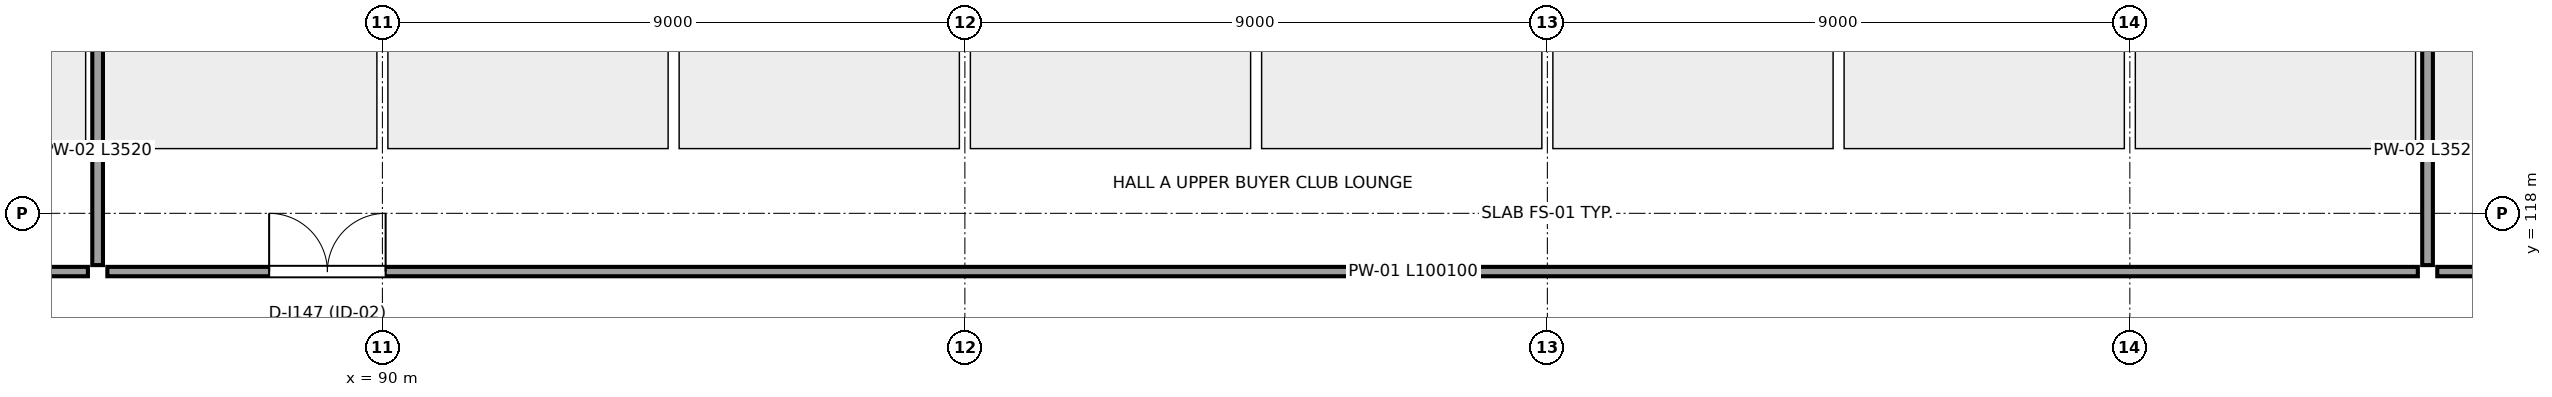
"""IFC4 building model, lengths in metres.
Left out: names, types, materials, properties, quantities, classifications, styles, units other than length and angle.
Written with IfcOpenShell. Run it as: python <this file> out.ifc"""

import sys

from ifc_helpers import new_model, si_unit, direction, frame, frame_2d, origin, place, context, subcontext, project, spatial, rectangle, extrude, element, fill, save


model = new_model("IFC4")
c1 = context("Model", 3, precision=1e-05, world=origin(), true_north=direction((0.0, 1.0)))
c2 = subcontext(c1, "Body", "Model", "MODEL_VIEW")
j1 = project(units=[si_unit("LENGTHUNIT", "METRE"), si_unit("PLANEANGLEUNIT", "RADIAN")], contexts=[c1])
p1 = place(None, origin())
s1 = spatial("IfcSite", under=j1, at=p1, CompositionType="ELEMENT")
p2 = place(p1, origin())
s2 = spatial("IfcBuilding", under=s1, at=p2, CompositionType="ELEMENT")
p3 = place(p2, frame((0.0, 0.0, 12.0)))
s3 = spatial("IfcBuildingStorey", under=s2, at=p3, CompositionType="ELEMENT", Elevation=12.0)
p4 = place(p3, frame((68.15, 117.1, 0.0), z_axis=(0.0, 0.0, 1.0), x_axis=(1.0, 0.0, 0.0)))
e1 = element("IfcWall", 1, at=p4, inside=s3, PredefinedType="PARTITIONING", context=c2, shape_type="SweptSolid", body=[
    extrude(rectangle(XDim=17.3, YDim=0.145, at=frame_2d((8.65, 0.0))), origin(), (0.0, 0.0, 1.0), 2.95),
])
p5 = place(p4, frame((2.5, 0.0, 0.0)))
e2 = element("IfcOpeningElement", 2, at=p5, cuts=e1, PredefinedType="OPENING", context=c2, shape_type="SweptSolid", body=[
    extrude(rectangle(XDim=1.8, YDim=2.3, at=frame_2d((0.9, 1.15))), frame((0.0, 0.083, 0.0), z_axis=(0.0, -1.0, 0.0), x_axis=(1.0, 0.0, 0.0)), (0.0, 0.0, 1.0), 0.165),
])
p6 = place(p3, frame((85.75, 117.1, 0.0), z_axis=(0.0, 0.0, 1.0), x_axis=(1.0, 0.0, 0.0)))
e3 = element("IfcWall", 3, at=p6, inside=s3, PredefinedType="PARTITIONING", context=c2, shape_type="SweptSolid", body=[
    extrude(rectangle(XDim=35.7, YDim=0.145, at=frame_2d((17.85, 0.0))), origin(), (0.0, 0.0, 1.0), 2.95),
])
p7 = place(p6, frame((2.5, 0.0, 0.0)))
e4 = element("IfcOpeningElement", 4, at=p7, cuts=e3, PredefinedType="OPENING", context=c2, shape_type="SweptSolid", body=[
    extrude(rectangle(XDim=1.8, YDim=2.3, at=frame_2d((0.9, 1.15))), frame((0.0, 0.083, 0.0), z_axis=(0.0, -1.0, 0.0), x_axis=(1.0, 0.0, 0.0)), (0.0, 0.0, 1.0), 0.165),
])
p8 = place(p3, frame((121.75, 117.1, 0.0), z_axis=(0.0, 0.0, 1.0), x_axis=(1.0, 0.0, 0.0)))
e5 = element("IfcWall", 5, at=p8, inside=s3, PredefinedType="PARTITIONING", context=c2, shape_type="SweptSolid", body=[
    extrude(rectangle(XDim=29.6, YDim=0.145, at=frame_2d((14.8, 0.0))), origin(), (0.0, 0.0, 1.0), 2.95),
])
p9 = place(p8, frame((2.5, 0.0, 0.0)))
e6 = element("IfcOpeningElement", 6, at=p9, cuts=e5, PredefinedType="OPENING", context=c2, shape_type="SweptSolid", body=[
    extrude(rectangle(XDim=0.98, YDim=2.15, at=frame_2d((0.49, 1.075))), frame((0.0, 0.083, 0.0), z_axis=(0.0, -1.0, 0.0), x_axis=(1.0, 0.0, 0.0)), (0.0, 0.0, 1.0), 0.165),
])
for number, where, z_axis, x_axis in (
    (7, (85.6, 117.2, 0.0), (0.0, 0.0, 1.0), (0.0, 1.0, 0.0)),
    (8, (121.6, 117.2, 0.0), (0.0, 0.0, 1.0), (0.0, 1.0, 0.0)),
):
    element("IfcWall", number, at=place(p3, frame(where, z_axis=z_axis, x_axis=x_axis)), inside=s3, PredefinedType="PARTITIONING", context=c2, shape_type="SweptSolid", body=[
        extrude(rectangle(XDim=3.52, YDim=0.165, at=frame_2d((1.76, 0.0))), origin(), (0.0, 0.0, 1.0), 2.95),
    ])
p10 = place(p7, origin())
e9 = element("IfcDoor", 9, at=p10, inside=s3, OperationType="DOUBLE_DOOR_SINGLE_SWING", PredefinedType="DOOR", context=c2, shape_type="SweptSolid", body=[
    extrude(rectangle(XDim=1.8, YDim=2.3, at=frame_2d((0.9, 1.15))), frame((0.0, 0.025, 0.0), z_axis=(0.0, -1.0, 0.0), x_axis=(1.0, 0.0, 0.0)), (0.0, 0.0, 1.0), 0.05),
])
fill(e4, e9)
save(model, sys.argv[1])
